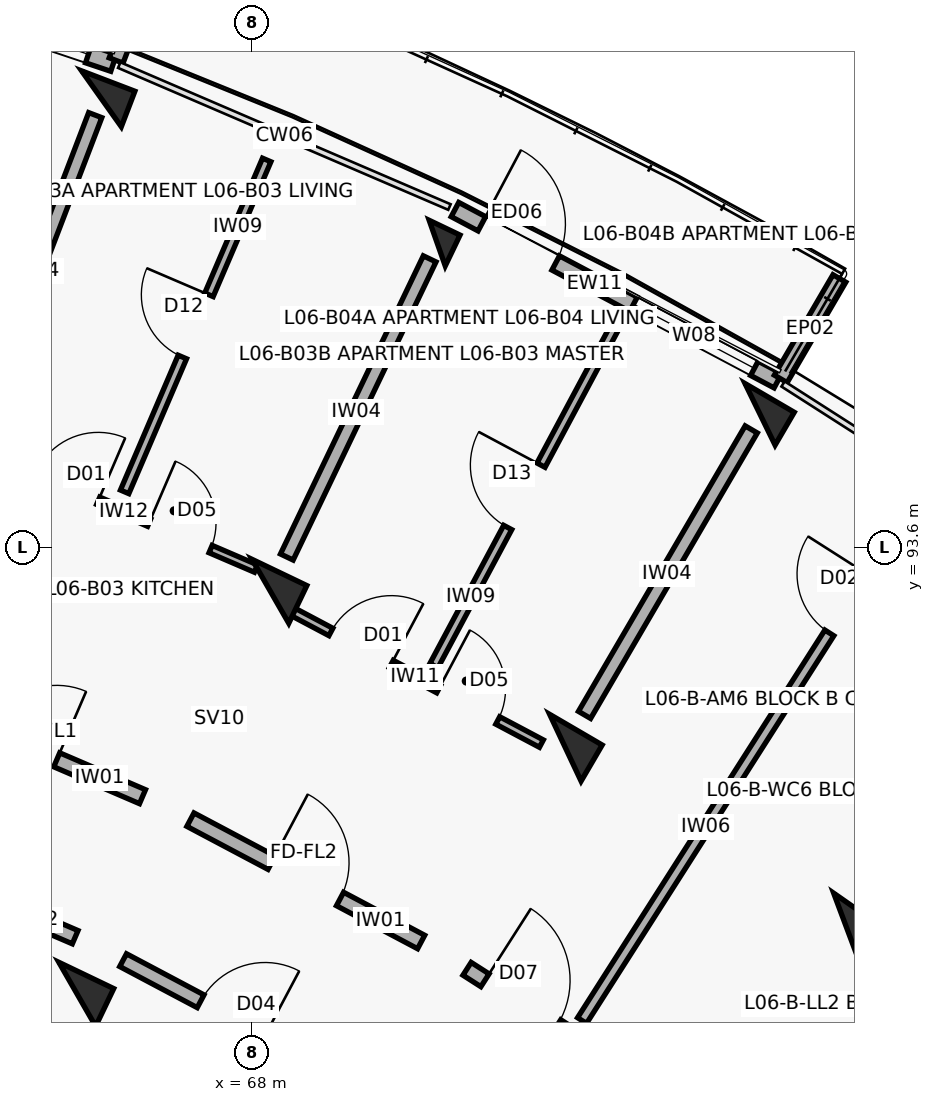
"""IFC4 building model, lengths in metres.
Left out: names, types, materials, properties, quantities, classifications, styles, units other than length and angle.
Written with IfcOpenShell. Run it as: python <this file> out.ifc"""

import sys

from ifc_helpers import new_model, si_unit, direction, frame, frame_2d, origin, origin_2d, place, context, subcontext, project, spatial, rectangle, extrude, element, fill, save


model = new_model("IFC4")
c1 = context("Model", 3, precision=1e-05, world=origin(), true_north=direction((0.0, 1.0)))
c2 = subcontext(c1, "Body", "Model", "MODEL_VIEW")
j1 = project(units=[si_unit("LENGTHUNIT", "METRE"), si_unit("PLANEANGLEUNIT", "RADIAN")], contexts=[c1])
p1 = place(None, origin())
s1 = spatial("IfcSite", under=j1, at=p1, CompositionType="ELEMENT")
p2 = place(p1, origin())
s2 = spatial("IfcBuilding", under=s1, at=p2, CompositionType="ELEMENT")
p3 = place(p2, frame((0.0, 0.0, 20.5)))
s3 = spatial("IfcBuildingStorey", under=s2, at=p3, CompositionType="ELEMENT", Elevation=20.5)
p4 = place(p3, frame((66.024, 99.499, 0.0), z_axis=(0.0, 0.0, 1.0), x_axis=(0.357064076459, 0.934079892355, 0.0)))
e1 = element("IfcColumn", 1, at=p4, inside=s3, PredefinedType="COLUMN", context=c2, shape_type="SweptSolid", body=[
    extrude(rectangle(XDim=0.5, YDim=0.75, at=origin_2d()), origin(), (0.0, 0.0, 1.0), 3.1),
])
for number, where, z_axis, x_axis in (
    (2, (65.706, 87.716, 0.0), (0.0, 0.0, 1.0), (0.432, 0.902, 0.0)),
    (3, (68.246, 93.019, 0.0), (0.0, 0.0, 1.0), (0.432, 0.902, 0.0)),
):
    element("IfcColumn", number, at=place(p3, frame(where, z_axis=z_axis, x_axis=x_axis)), inside=s3, PredefinedType="COLUMN", context=c2, shape_type="SweptSolid", body=[
        extrude(rectangle(XDim=0.55, YDim=0.8, at=origin_2d()), origin(), (0.0, 0.0, 1.0), 3.1),
    ])
p5 = place(p3, frame((70.441, 97.6, 0.0), z_axis=(0.0, 0.0, 1.0), x_axis=(0.432085748802, 0.901832526405, 0.0)))
e4 = element("IfcColumn", 4, at=p5, inside=s3, PredefinedType="COLUMN", context=c2, shape_type="SweptSolid", body=[
    extrude(rectangle(XDim=0.45, YDim=0.45, at=origin_2d()), origin(), (0.0, 0.0, 1.0), 3.1),
])
p6 = place(p3, frame((72.127, 90.96, 0.0), z_axis=(0.0, 0.0, 1.0), x_axis=(0.504226211181, 0.863571611366, 0.0)))
e5 = element("IfcColumn", 5, at=p6, inside=s3, PredefinedType="COLUMN", context=c2, shape_type="SweptSolid", body=[
    extrude(rectangle(XDim=0.55, YDim=0.8, at=origin_2d()), origin(), (0.0, 0.0, 1.0), 3.1),
])
p7 = place(p3, frame((74.689, 95.347, 0.0), z_axis=(0.0, 0.0, 1.0), x_axis=(0.504226211181, 0.863571611366, 0.0)))
e6 = element("IfcColumn", 6, at=p7, inside=s3, PredefinedType="COLUMN", context=c2, shape_type="SweptSolid", body=[
    extrude(rectangle(XDim=0.5, YDim=0.75, at=origin_2d()), origin(), (0.0, 0.0, 1.0), 3.1),
])
p8 = place(p3, frame((75.828, 88.592, 0.0), z_axis=(0.0, 0.0, 1.0), x_axis=(0.573004420611, 0.819552276527, 0.0)))
e7 = element("IfcColumn", 7, at=p8, inside=s3, PredefinedType="COLUMN", context=c2, shape_type="SweptSolid", body=[
    extrude(rectangle(XDim=0.55, YDim=0.8, at=origin_2d()), origin(), (0.0, 0.0, 1.0), 3.1),
])
p9 = place(p3, frame((61.625, 101.504, 0.0), z_axis=(0.0, 0.0, 1.0), x_axis=(0.947867898788, -0.318663531717, 0.0)))
e8 = element("IfcWall", 8, at=p9, inside=s3, PredefinedType="SOLIDWALL", context=c2, shape_type="SweptSolid", body=[
    extrude(rectangle(XDim=4.809, YDim=0.235, at=frame_2d((2.405, 0.0))), origin(), (0.0, 0.0, 1.0), 2.25),
])
p10 = place(p9, frame((0.4, 0.0, 0.0)))
e9 = element("IfcOpeningElement", 9, at=p10, cuts=e8, PredefinedType="OPENING", context=c2, shape_type="SweptSolid", body=[
    extrude(rectangle(XDim=1.1, YDim=2.15, at=frame_2d((0.55, 1.075))), frame((0.0, 0.127, 0.0), z_axis=(0.0, -1.0, 0.0), x_axis=(1.0, 0.0, 0.0)), (0.0, 0.0, 1.0), 0.255),
])
p11 = place(p9, frame((2.659, 0.0, 0.35)))
e10 = element("IfcOpeningElement", 10, at=p11, cuts=e8, PredefinedType="OPENING", context=c2, shape_type="SweptSolid", body=[
    extrude(rectangle(XDim=1.8, YDim=1.65, at=frame_2d((0.9, 0.825))), frame((0.0, 0.127, 0.0), z_axis=(0.0, -1.0, 0.0), x_axis=(1.0, 0.0, 0.0)), (0.0, 0.0, 1.0), 0.255),
])
p12 = place(p3, frame((66.217, 100.003, 0.0), z_axis=(0.0, 0.0, 1.0), x_axis=(0.356957296461, 0.934120703391, 0.0)))
e11 = element("IfcWall", 11, at=p12, inside=s3, PredefinedType="PARAPET", context=c2, shape_type="SweptSolid", body=[
    extrude(rectangle(XDim=1.53, YDim=0.195, at=frame_2d((0.765, 0.0))), origin(), (0.0, 0.0, 1.0), 2.25),
])
p13 = place(p3, frame((70.675, 98.042, 0.0), z_axis=(0.0, 0.0, 1.0), x_axis=(0.883448093208, -0.468529045639, 0.0)))
e12 = element("IfcWall", 12, at=p13, inside=s3, PredefinedType="SOLIDWALL", context=c2, shape_type="SweptSolid", body=[
    extrude(rectangle(XDim=4.809, YDim=0.212, at=frame_2d((2.405, 0.0))), origin(), (0.0, 0.0, 1.0), 2.25),
])
p14 = place(p13, frame((0.4, 0.0, 0.0)))
e13 = element("IfcOpeningElement", 13, at=p14, cuts=e12, PredefinedType="OPENING", context=c2, shape_type="SweptSolid", body=[
    extrude(rectangle(XDim=1.1, YDim=2.15, at=frame_2d((0.55, 1.075))), frame((0.0, 0.116, 0.0), z_axis=(0.0, -1.0, 0.0), x_axis=(1.0, 0.0, 0.0)), (0.0, 0.0, 1.0), 0.232),
])
p15 = place(p13, frame((2.659, 0.0, 0.35)))
e14 = element("IfcOpeningElement", 14, at=p15, cuts=e12, PredefinedType="OPENING", context=c2, shape_type="SweptSolid", body=[
    extrude(rectangle(XDim=1.8, YDim=1.65, at=frame_2d((0.9, 0.825))), frame((0.0, 0.116, 0.0), z_axis=(0.0, -1.0, 0.0), x_axis=(1.0, 0.0, 0.0)), (0.0, 0.0, 1.0), 0.232),
])
p16 = place(p3, frame((74.961, 95.813, 0.0), z_axis=(0.0, 0.0, 1.0), x_axis=(0.504228145431, 0.863570481985, 0.0)))
e15 = element("IfcWall", 15, at=p16, inside=s3, PredefinedType="PARAPET", context=c2, shape_type="SweptSolid", body=[
    extrude(rectangle(XDim=1.53, YDim=0.195, at=frame_2d((0.765, 0.0))), origin(), (0.0, 0.0, 1.0), 2.25),
])
p17 = place(p3, frame((63.407, 91.673, 0.0), z_axis=(0.0, 0.0, 1.0), x_axis=(0.918718172399, -0.394913813008, 0.0)))
e16 = element("IfcWall", 16, at=p17, inside=s3, PredefinedType="SOLIDWALL", context=c2, shape_type="SweptSolid", body=[
    extrude(rectangle(XDim=3.436, YDim=0.2, at=frame_2d((1.718, 0.0))), origin(), (0.0, 0.0, 1.0), 2.08),
])
p18 = place(p17, frame((1.228, 0.0, 0.0)))
e17 = element("IfcOpeningElement", 17, at=p18, cuts=e16, PredefinedType="OPENING", context=c2, shape_type="SweptSolid", body=[
    extrude(rectangle(XDim=0.98, YDim=2.15, at=frame_2d((0.49, 1.075))), frame((0.0, 0.11, 0.0), z_axis=(0.0, -1.0, 0.0), x_axis=(1.0, 0.0, 0.0)), (0.0, 0.0, 1.0), 0.22),
])
p19 = place(p3, frame((62.675, 89.758, 0.0), z_axis=(0.0, 0.0, 1.0), x_axis=(0.918723391052, -0.394901672235, 0.0)))
e18 = element("IfcWall", 18, at=p19, inside=s3, PredefinedType="SOLIDWALL", context=c2, shape_type="SweptSolid", body=[
    extrude(rectangle(XDim=3.269, YDim=0.19, at=frame_2d((1.634, 0.0))), origin(), (0.0, 0.0, 1.0), 2.08),
])
p20 = place(p19, frame((1.164, 0.0, 0.0)))
e19 = element("IfcOpeningElement", 19, at=p20, cuts=e18, PredefinedType="OPENING", context=c2, shape_type="SweptSolid", body=[
    extrude(rectangle(XDim=0.94, YDim=2.1, at=frame_2d((0.47, 1.05))), frame((0.0, 0.105, 0.0), z_axis=(0.0, -1.0, 0.0), x_axis=(1.0, 0.0, 0.0)), (0.0, 0.0, 1.0), 0.21),
])
p21 = place(p3, frame((64.557, 94.822, 0.0), z_axis=(0.0, 0.0, 1.0), x_axis=(0.918726854017, -0.394893615684, 0.0)))
e20 = element("IfcWall", 20, at=p21, inside=s3, PredefinedType="PARTITIONING", context=c2, shape_type="SweptSolid", body=[
    extrude(rectangle(XDim=3.81, YDim=0.105, at=frame_2d((1.905, 0.0))), origin(), (0.0, 0.0, 1.0), 2.08),
])
p22 = place(p21, frame((0.65, 0.0, 0.0)))
e21 = element("IfcOpeningElement", 21, at=p22, cuts=e20, PredefinedType="OPENING", context=c2, shape_type="SweptSolid", body=[
    extrude(rectangle(XDim=0.9, YDim=2.1, at=frame_2d((0.45, 1.05))), frame((0.0, 0.062, 0.0), z_axis=(0.0, -1.0, 0.0), x_axis=(1.0, 0.0, 0.0)), (0.0, 0.0, 1.0), 0.125),
])
p23 = place(p21, frame((2.28, 0.0, 0.0)))
e22 = element("IfcOpeningElement", 22, at=p23, cuts=e20, PredefinedType="OPENING", context=c2, shape_type="SweptSolid", body=[
    extrude(rectangle(XDim=0.88, YDim=2.1, at=frame_2d((0.44, 1.05))), frame((0.0, 0.062, 0.0), z_axis=(0.0, -1.0, 0.0), x_axis=(1.0, 0.0, 0.0)), (0.0, 0.0, 1.0), 0.125),
])
p24 = place(p3, frame((66.329, 94.327, 0.0), z_axis=(0.0, 0.0, 1.0), x_axis=(0.393553279267, 0.919301809189, 0.0)))
e23 = element("IfcWall", 23, at=p24, inside=s3, PredefinedType="PARTITIONING", context=c2, shape_type="SweptSolid", body=[
    extrude(rectangle(XDim=4.75, YDim=0.12, at=frame_2d((2.375, 0.0))), origin(), (0.0, 0.0, 1.0), 2.08),
])
p25 = place(p24, frame((1.93, 0.0, 0.0)))
e24 = element("IfcOpeningElement", 24, at=p25, cuts=e23, PredefinedType="OPENING", context=c2, shape_type="SweptSolid", body=[
    extrude(rectangle(XDim=0.89, YDim=2.1, at=frame_2d((0.445, 1.05))), frame((0.0, 0.07, 0.0), z_axis=(0.0, -1.0, 0.0), x_axis=(1.0, 0.0, 0.0)), (0.0, 0.0, 1.0), 0.14),
])
p26 = place(p3, frame((64.389, 95.22, 0.0), z_axis=(0.0, 0.0, 1.0), x_axis=(0.357064016205, 0.934079915388, 0.0)))
e25 = element("IfcWall", 25, at=p26, inside=s3, PredefinedType="SOLIDWALL", context=c2, shape_type="SweptSolid", body=[
    extrude(rectangle(XDim=4.35, YDim=0.185, at=frame_2d((2.175, 0.0))), origin(), (0.0, 0.0, 1.0), 2.08),
])
p27 = place(p3, frame((67.194, 90.014, 0.0), z_axis=(0.0, 0.0, 1.0), x_axis=(0.883410853063, -0.468599258099, 0.0)))
e26 = element("IfcWall", 26, at=p27, inside=s3, PredefinedType="SOLIDWALL", context=c2, shape_type="SweptSolid", body=[
    extrude(rectangle(XDim=3.436, YDim=0.2, at=frame_2d((1.718, 0.0))), origin(), (0.0, 0.0, 1.0), 2.08),
])
p28 = place(p27, frame((1.208, 0.0, 0.0)))
e27 = element("IfcOpeningElement", 27, at=p28, cuts=e26, PredefinedType="OPENING", context=c2, shape_type="SweptSolid", body=[
    extrude(rectangle(XDim=1.02, YDim=2.15, at=frame_2d((0.51, 1.075))), frame((0.0, 0.11, 0.0), z_axis=(0.0, -1.0, 0.0), x_axis=(1.0, 0.0, 0.0)), (0.0, 0.0, 1.0), 0.22),
])
p29 = place(p3, frame((66.309, 88.165, 0.0), z_axis=(0.0, 0.0, 1.0), x_axis=(0.883444301944, -0.468536194293, 0.0)))
e28 = element("IfcWall", 28, at=p29, inside=s3, PredefinedType="SOLIDWALL", context=c2, shape_type="SweptSolid", body=[
    extrude(rectangle(XDim=3.269, YDim=0.19, at=frame_2d((1.634, 0.0))), origin(), (0.0, 0.0, 1.0), 2.08),
])
p30 = place(p29, frame((1.154, 0.0, 0.0)))
e29 = element("IfcOpeningElement", 29, at=p30, cuts=e28, PredefinedType="OPENING", context=c2, shape_type="SweptSolid", body=[
    extrude(rectangle(XDim=0.96, YDim=2.1, at=frame_2d((0.48, 1.05))), frame((0.0, 0.105, 0.0), z_axis=(0.0, -1.0, 0.0), x_axis=(1.0, 0.0, 0.0)), (0.0, 0.0, 1.0), 0.21),
])
p31 = place(p3, frame((68.468, 92.788, 0.0), z_axis=(0.0, 0.0, 1.0), x_axis=(0.883450371448, -0.468524749814, 0.0)))
e30 = element("IfcWall", 30, at=p31, inside=s3, PredefinedType="PARTITIONING", context=c2, shape_type="SweptSolid", body=[
    extrude(rectangle(XDim=3.785, YDim=0.11, at=frame_2d((1.893, 0.0))), origin(), (0.0, 0.0, 1.0), 2.08),
])
p32 = place(p31, frame((0.65, 0.0, 0.0)))
e31 = element("IfcOpeningElement", 31, at=p32, cuts=e30, PredefinedType="OPENING", context=c2, shape_type="SweptSolid", body=[
    extrude(rectangle(XDim=0.9, YDim=2.1, at=frame_2d((0.45, 1.05))), frame((0.0, 0.065, 0.0), z_axis=(0.0, -1.0, 0.0), x_axis=(1.0, 0.0, 0.0)), (0.0, 0.0, 1.0), 0.13),
])
p33 = place(p31, frame((2.255, 0.0, 0.0)))
e32 = element("IfcOpeningElement", 32, at=p33, cuts=e30, PredefinedType="OPENING", context=c2, shape_type="SweptSolid", body=[
    extrude(rectangle(XDim=0.88, YDim=2.1, at=frame_2d((0.44, 1.05))), frame((0.0, 0.065, 0.0), z_axis=(0.0, -1.0, 0.0), x_axis=(1.0, 0.0, 0.0)), (0.0, 0.0, 1.0), 0.13),
])
p34 = place(p3, frame((70.398, 92.041, 0.0), z_axis=(0.0, 0.0, 1.0), x_axis=(0.471222960991, 0.882014127457, 0.0)))
e33 = element("IfcWall", 33, at=p34, inside=s3, PredefinedType="PARTITIONING", context=c2, shape_type="SweptSolid", body=[
    extrude(rectangle(XDim=5.05, YDim=0.12, at=frame_2d((2.525, 0.0))), origin(), (0.0, 0.0, 1.0), 2.08),
])
p35 = place(p34, frame((2.06, 0.0, 0.0)))
e34 = element("IfcOpeningElement", 34, at=p35, cuts=e33, PredefinedType="OPENING", context=c2, shape_type="SweptSolid", body=[
    extrude(rectangle(XDim=0.93, YDim=2.1, at=frame_2d((0.465, 1.05))), frame((0.0, 0.07, 0.0), z_axis=(0.0, -1.0, 0.0), x_axis=(1.0, 0.0, 0.0)), (0.0, 0.0, 1.0), 0.14),
])
p36 = place(p3, frame((68.462, 93.469, 0.0), z_axis=(0.0, 0.0, 1.0), x_axis=(0.432086898897, 0.901831975371, 0.0)))
e35 = element("IfcWall", 35, at=p36, inside=s3, PredefinedType="SOLIDWALL", context=c2, shape_type="SweptSolid", body=[
    extrude(rectangle(XDim=4.35, YDim=0.185, at=frame_2d((2.175, 0.0))), origin(), (0.0, 0.0, 1.0), 2.08),
])
p37 = place(p3, frame((70.834, 88.051, 0.0), z_axis=(0.0, 0.0, 1.0), x_axis=(0.842257205985, -0.539075874963, 0.0)))
e36 = element("IfcWall", 36, at=p37, inside=s3, PredefinedType="SOLIDWALL", context=c2, shape_type="SweptSolid", body=[
    extrude(rectangle(XDim=3.436, YDim=0.2, at=frame_2d((1.718, 0.0))), origin(), (0.0, 0.0, 1.0), 2.08),
])
p38 = place(p37, frame((0.28, 0.0, 0.0)))
e37 = element("IfcOpeningElement", 37, at=p38, cuts=e36, PredefinedType="OPENING", context=c2, shape_type="SweptSolid", body=[
    extrude(rectangle(XDim=1.12, YDim=2.15, at=frame_2d((0.56, 1.075))), frame((0.0, 0.11, 0.0), z_axis=(0.0, -1.0, 0.0), x_axis=(1.0, 0.0, 0.0)), (0.0, 0.0, 1.0), 0.22),
])
p39 = place(p37, frame((2.266, 0.0, 0.0)))
e38 = element("IfcOpeningElement", 38, at=p39, cuts=e36, PredefinedType="OPENING", context=c2, shape_type="SweptSolid", body=[
    extrude(rectangle(XDim=0.95, YDim=2.1, at=frame_2d((0.475, 1.05))), frame((0.0, 0.11, 0.0), z_axis=(0.0, -1.0, 0.0), x_axis=(1.0, 0.0, 0.0)), (0.0, 0.0, 1.0), 0.22),
])
p40 = place(p3, frame((72.347, 87.37, 0.0), z_axis=(0.0, 0.0, 1.0), x_axis=(0.537777309481, 0.843086926365, 0.0)))
e39 = element("IfcWall", 39, at=p40, inside=s3, PredefinedType="PARTITIONING", context=c2, shape_type="SweptSolid", body=[
    extrude(rectangle(XDim=7.95, YDim=0.14, at=frame_2d((3.975, 0.0))), origin(), (0.0, 0.0, 1.0), 2.08),
])
p41 = place(p40, frame((6.05, 0.0, 0.0)))
e40 = element("IfcOpeningElement", 40, at=p41, cuts=e39, PredefinedType="OPENING", context=c2, shape_type="SweptSolid", body=[
    extrude(rectangle(XDim=0.92, YDim=2.1, at=frame_2d((0.46, 1.05))), frame((0.0, 0.08, 0.0), z_axis=(0.0, -1.0, 0.0), x_axis=(1.0, 0.0, 0.0)), (0.0, 0.0, 1.0), 0.16),
])
p42 = place(p3, frame((72.379, 91.392, 0.0), z_axis=(0.0, 0.0, 1.0), x_axis=(0.504216452091, 0.863577309475, 0.0)))
e41 = element("IfcWall", 41, at=p42, inside=s3, PredefinedType="SOLIDWALL", context=c2, shape_type="SweptSolid", body=[
    extrude(rectangle(XDim=4.35, YDim=0.185, at=frame_2d((2.175, 0.0))), origin(), (0.0, 0.0, 1.0), 2.08),
])
p43 = place(p11, origin())
e42 = element("IfcWindow", 42, at=p43, inside=s3, PartitioningType="TRIPLE_PANEL_VERTICAL", PredefinedType="WINDOW", context=c2, shape_type="SweptSolid", body=[
    extrude(rectangle(XDim=1.8, YDim=1.65, at=frame_2d((0.9, 0.825))), frame((0.0, 0.03, 0.0), z_axis=(0.0, -1.0, 0.0), x_axis=(1.0, 0.0, 0.0)), (0.0, 0.0, 1.0), 0.06),
])
fill(e10, e42)
p44 = place(p14, origin())
e43 = element("IfcDoor", 43, at=p44, inside=s3, OperationType="SINGLE_SWING_LEFT", PredefinedType="DOOR", context=c2, shape_type="SweptSolid", body=[
    extrude(rectangle(XDim=1.1, YDim=2.15, at=frame_2d((0.55, 1.075))), frame((0.0, 0.025, 0.0), z_axis=(0.0, -1.0, 0.0), x_axis=(1.0, 0.0, 0.0)), (0.0, 0.0, 1.0), 0.05),
])
fill(e13, e43)
p45 = place(p15, origin())
e44 = element("IfcWindow", 44, at=p45, inside=s3, PartitioningType="TRIPLE_PANEL_VERTICAL", PredefinedType="WINDOW", context=c2, shape_type="SweptSolid", body=[
    extrude(rectangle(XDim=1.8, YDim=1.65, at=frame_2d((0.9, 0.825))), frame((0.0, 0.03, 0.0), z_axis=(0.0, -1.0, 0.0), x_axis=(1.0, 0.0, 0.0)), (0.0, 0.0, 1.0), 0.06),
])
fill(e14, e44)
p46 = place(p18, origin())
e45 = element("IfcDoor", 45, at=p46, inside=s3, OperationType="SINGLE_SWING_RIGHT", PredefinedType="DOOR", context=c2, shape_type="SweptSolid", body=[
    extrude(rectangle(XDim=0.98, YDim=2.15, at=frame_2d((0.49, 1.075))), frame((0.0, 0.025, 0.0), z_axis=(0.0, -1.0, 0.0), x_axis=(1.0, 0.0, 0.0)), (0.0, 0.0, 1.0), 0.05),
])
fill(e17, e45)
p47 = place(p22, origin())
e46 = element("IfcDoor", 46, at=p47, inside=s3, OperationType="SINGLE_SWING_RIGHT", PredefinedType="DOOR", context=c2, shape_type="SweptSolid", body=[
    extrude(rectangle(XDim=0.9, YDim=2.1, at=frame_2d((0.45, 1.05))), frame((0.0, 0.025, 0.0), z_axis=(0.0, -1.0, 0.0), x_axis=(1.0, 0.0, 0.0)), (0.0, 0.0, 1.0), 0.05),
])
fill(e21, e46)
p48 = place(p23, origin())
e47 = element("IfcDoor", 47, at=p48, inside=s3, OperationType="SINGLE_SWING_LEFT", PredefinedType="DOOR", context=c2, shape_type="SweptSolid", body=[
    extrude(rectangle(XDim=0.88, YDim=2.1, at=frame_2d((0.44, 1.05))), frame((0.0, 0.025, 0.0), z_axis=(0.0, -1.0, 0.0), x_axis=(1.0, 0.0, 0.0)), (0.0, 0.0, 1.0), 0.05),
])
fill(e22, e47)
p49 = place(p25, origin())
e48 = element("IfcDoor", 48, at=p49, inside=s3, OperationType="SINGLE_SWING_RIGHT", PredefinedType="DOOR", context=c2, shape_type="SweptSolid", body=[
    extrude(rectangle(XDim=0.89, YDim=2.1, at=frame_2d((0.445, 1.05))), frame((0.0, 0.025, 0.0), z_axis=(0.0, -1.0, 0.0), x_axis=(1.0, 0.0, 0.0)), (0.0, 0.0, 1.0), 0.05),
])
fill(e24, e48)
p50 = place(p28, origin())
e49 = element("IfcDoor", 49, at=p50, inside=s3, OperationType="SINGLE_SWING_LEFT", PredefinedType="DOOR", context=c2, shape_type="SweptSolid", body=[
    extrude(rectangle(XDim=1.02, YDim=2.15, at=frame_2d((0.51, 1.075))), frame((0.0, 0.025, 0.0), z_axis=(0.0, -1.0, 0.0), x_axis=(1.0, 0.0, 0.0)), (0.0, 0.0, 1.0), 0.05),
])
fill(e27, e49)
p51 = place(p30, origin())
e50 = element("IfcDoor", 50, at=p51, inside=s3, OperationType="SINGLE_SWING_RIGHT", PredefinedType="DOOR", context=c2, shape_type="SweptSolid", body=[
    extrude(rectangle(XDim=0.96, YDim=2.1, at=frame_2d((0.48, 1.05))), frame((0.0, 0.025, 0.0), z_axis=(0.0, -1.0, 0.0), x_axis=(1.0, 0.0, 0.0)), (0.0, 0.0, 1.0), 0.05),
])
fill(e29, e50)
p52 = place(p32, origin())
e51 = element("IfcDoor", 51, at=p52, inside=s3, OperationType="SINGLE_SWING_RIGHT", PredefinedType="DOOR", context=c2, shape_type="SweptSolid", body=[
    extrude(rectangle(XDim=0.9, YDim=2.1, at=frame_2d((0.45, 1.05))), frame((0.0, 0.025, 0.0), z_axis=(0.0, -1.0, 0.0), x_axis=(1.0, 0.0, 0.0)), (0.0, 0.0, 1.0), 0.05),
])
fill(e31, e51)
p53 = place(p33, origin())
e52 = element("IfcDoor", 52, at=p53, inside=s3, OperationType="SINGLE_SWING_LEFT", PredefinedType="DOOR", context=c2, shape_type="SweptSolid", body=[
    extrude(rectangle(XDim=0.88, YDim=2.1, at=frame_2d((0.44, 1.05))), frame((0.0, 0.025, 0.0), z_axis=(0.0, -1.0, 0.0), x_axis=(1.0, 0.0, 0.0)), (0.0, 0.0, 1.0), 0.05),
])
fill(e32, e52)
p54 = place(p35, origin())
e53 = element("IfcDoor", 53, at=p54, inside=s3, OperationType="SINGLE_SWING_RIGHT", PredefinedType="DOOR", context=c2, shape_type="SweptSolid", body=[
    extrude(rectangle(XDim=0.93, YDim=2.1, at=frame_2d((0.465, 1.05))), frame((0.0, 0.025, 0.0), z_axis=(0.0, -1.0, 0.0), x_axis=(1.0, 0.0, 0.0)), (0.0, 0.0, 1.0), 0.05),
])
fill(e34, e53)
p55 = place(p38, origin())
e54 = element("IfcDoor", 54, at=p55, inside=s3, OperationType="SINGLE_SWING_LEFT", PredefinedType="DOOR", context=c2, shape_type="SweptSolid", body=[
    extrude(rectangle(XDim=1.12, YDim=2.15, at=frame_2d((0.56, 1.075))), frame((0.0, 0.025, 0.0), z_axis=(0.0, -1.0, 0.0), x_axis=(1.0, 0.0, 0.0)), (0.0, 0.0, 1.0), 0.05),
])
fill(e37, e54)
p56 = place(p41, origin())
e55 = element("IfcDoor", 55, at=p56, inside=s3, OperationType="SINGLE_SWING_RIGHT", PredefinedType="DOOR", context=c2, shape_type="SweptSolid", body=[
    extrude(rectangle(XDim=0.92, YDim=2.1, at=frame_2d((0.46, 1.05))), frame((0.0, 0.025, 0.0), z_axis=(0.0, -1.0, 0.0), x_axis=(1.0, 0.0, 0.0)), (0.0, 0.0, 1.0), 0.05),
])
fill(e40, e55)
save(model, sys.argv[1])
